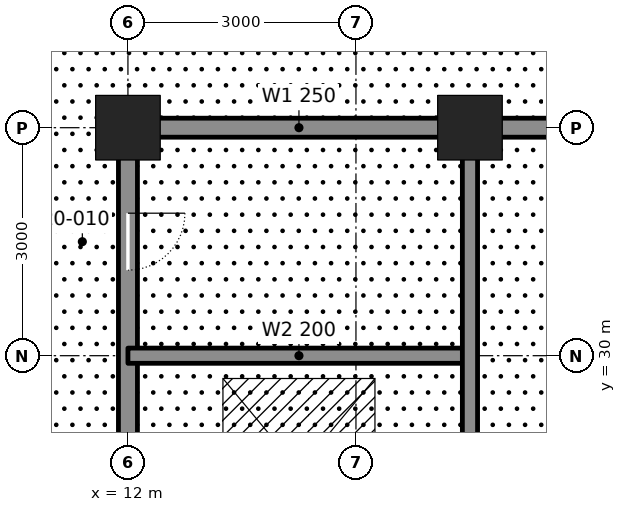
"""IFC4 building model, lengths in metres.
Left out: names, types, materials, properties, quantities, classifications, styles, units other than length and angle.
Written with IfcOpenShell. Run it as: python <this file> out.ifc"""

import sys

from ifc_helpers import new_model, si_unit, direction, frame, frame_2d, origin, origin_2d, place, context, subcontext, project, spatial, rectangle, hollow_rectangle, extrude, element, fill, save


model = new_model("IFC4")
c1 = context("Model", 3, precision=1e-05, world=origin(), true_north=direction((0.0, 1.0)))
c2 = subcontext(c1, "Body", "Model", "MODEL_VIEW")
j1 = project(units=[si_unit("LENGTHUNIT", "METRE"), si_unit("PLANEANGLEUNIT", "RADIAN")], contexts=[c1])
p1 = place(None, origin())
s1 = spatial("IfcSite", under=j1, at=p1, CompositionType="ELEMENT")
p2 = place(p1, origin())
s2 = spatial("IfcBuilding", under=s1, at=p2, CompositionType="ELEMENT")
p3 = place(p2, frame((0.0, 0.0, 96.3)))
s3 = spatial("IfcBuildingStorey", under=s2, at=p3, CompositionType="ELEMENT", Elevation=96.3)
for number, where, z_axis, x_axis in (
    (1, (12.0, 33.0, 0.0), (0.0, 0.0, 1.0), (1.0, 0.0, 0.0)),
    (2, (16.5, 33.0, 0.0), (0.0, 0.0, 1.0), (1.0, 0.0, 0.0)),
):
    element("IfcColumn", number, at=place(p3, frame(where, z_axis=z_axis, x_axis=x_axis)), inside=s3, PredefinedType="COLUMN", context=c2, shape_type="SweptSolid", body=[
        extrude(hollow_rectangle(XDim=0.85, YDim=0.85, WallThickness=0.085, at=origin_2d()), origin(), (0.0, 0.0, 1.0), 6.0),
    ])
p4 = place(p3, frame((12.0, 24.25, 0.0), z_axis=(0.0, 0.0, 1.0), x_axis=(0.0, 1.0, 0.0)))
e3 = element("IfcWall", 3, at=p4, inside=s3, PredefinedType="SOLIDWALL", context=c2, shape_type="SweptSolid", body=[
    extrude(rectangle(XDim=8.5, YDim=0.25, at=frame_2d((4.25, 0.0))), origin(), (0.0, 0.0, 1.0), 4.913),
])
p5 = place(p4, frame((0.65, 0.0, 0.0)))
e4 = element("IfcOpeningElement", 4, at=p5, cuts=e3, PredefinedType="OPENING", context=c2, shape_type="SweptSolid", body=[
    extrude(rectangle(XDim=1.2, YDim=2.1, at=frame_2d((0.6, 1.05))), frame((0.0, 0.135, 0.0), z_axis=(0.0, -1.0, 0.0), x_axis=(1.0, 0.0, 0.0)), (0.0, 0.0, 1.0), 0.27),
])
p6 = place(p4, frame((6.875, 0.0, 0.0)))
e5 = element("IfcOpeningElement", 5, at=p6, cuts=e3, PredefinedType="OPENING", context=c2, shape_type="SweptSolid", body=[
    extrude(rectangle(XDim=0.75, YDim=2.1, at=frame_2d((0.375, 1.05))), frame((0.0, 0.135, 0.0), z_axis=(0.0, -1.0, 0.0), x_axis=(1.0, 0.0, 0.0)), (0.0, 0.0, 1.0), 0.27),
])
p7 = place(p3, frame((12.0, 30.0, 0.0), z_axis=(0.0, 0.0, 1.0), x_axis=(1.0, 0.0, 0.0)))
e6 = element("IfcWall", 6, at=p7, inside=s3, PredefinedType="SOLIDWALL", context=c2, shape_type="SweptSolid", body=[
    extrude(rectangle(XDim=4.5, YDim=0.2, at=frame_2d((2.25, 0.0))), origin(), (0.0, 0.0, 1.0), 5.84),
])
p8 = place(p3, frame((12.25, 33.0, 0.0), z_axis=(0.0, 0.0, 1.0), x_axis=(1.0, 0.0, 0.0)))
e7 = element("IfcWall", 7, at=p8, inside=s3, PredefinedType="SOLIDWALL", context=c2, shape_type="SweptSolid", body=[
    extrude(rectangle(XDim=4.0, YDim=0.25, at=frame_2d((2.0, 0.0))), origin(), (0.0, 0.0, 1.0), 4.981),
])
p9 = place(p3, frame((16.75, 33.0, 0.0), z_axis=(0.0, 0.0, 1.0), x_axis=(1.0, 0.0, 0.0)))
e8 = element("IfcWall", 8, at=p9, inside=s3, PredefinedType="SOLIDWALL", context=c2, shape_type="SweptSolid", body=[
    extrude(rectangle(XDim=2.5, YDim=0.25, at=frame_2d((1.25, 0.0))), origin(), (0.0, 0.0, 1.0), 4.981),
])
p10 = place(p3, frame((16.5, 24.25, 0.0), z_axis=(0.0, 0.0, 1.0), x_axis=(0.0, 1.0, 0.0)))
e9 = element("IfcWall", 9, at=p10, inside=s3, PredefinedType="SOLIDWALL", context=c2, shape_type="SweptSolid", body=[
    extrude(rectangle(XDim=8.5, YDim=0.2, at=frame_2d((4.25, 0.0))), origin(), (0.0, 0.0, 1.0), 4.913),
])
p11 = place(p6, frame((0.75, 0.0, 0.0), z_axis=(0.0, 0.0, 1.0), x_axis=(-1.0, 0.0, 0.0)))
e10 = element("IfcDoor", 10, at=p11, inside=s3, OperationType="SINGLE_SWING_LEFT", PredefinedType="DOOR", context=c2, shape_type="SweptSolid", body=[
    extrude(rectangle(XDim=0.75, YDim=2.1, at=frame_2d((0.375, 1.05))), frame((0.0, 0.025, 0.0), z_axis=(0.0, -1.0, 0.0), x_axis=(1.0, 0.0, 0.0)), (0.0, 0.0, 1.0), 0.05),
])
fill(e5, e10)
save(model, sys.argv[1])
